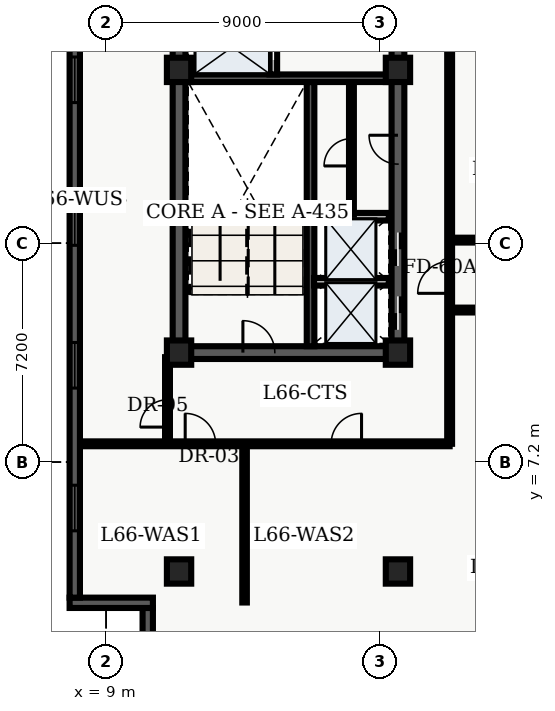
"""IFC4 building model, lengths in metres.
Left out: names, types, materials, properties, quantities, classifications, styles, units other than length and angle.
Written with IfcOpenShell. Run it as: python <this file> out.ifc"""

import sys

from ifc_helpers import new_model, entity, si_unit, converted_unit, direction, frame, origin_with_axes, origin_2d_with_axis, place, context, subcontext, project, spatial, polyline, rectangle, outline, extrude, element, fill, save


model = new_model("IFC4")
c1 = context("Model", 3, precision=1e-05, world=origin_with_axes(), true_north=direction((0.0, 1.0)))
c2 = subcontext(c1, "Body", "Model", "MODEL_VIEW")
j1 = project(units=[si_unit("LENGTHUNIT", "METRE"), converted_unit("PLANEANGLEUNIT", "DEGREE", entity("IfcPlaneAngleMeasure", 0.017), si_unit("PLANEANGLEUNIT", "RADIAN"), dimensions=[0, 0, 0, 0, 0, 0, 0])], contexts=[c1])
p1 = place(None, origin_with_axes())
s1 = spatial("IfcSite", under=j1, at=p1, CompositionType="ELEMENT")
p2 = place(p1, origin_with_axes())
s2 = spatial("IfcBuilding", under=s1, at=p2, CompositionType="ELEMENT")
p3 = place(p2, frame((0.0, 0.0, 268.5), z_axis=(0.0, 0.0, 1.0), x_axis=(1.0, 0.0, 0.0)))
s3 = spatial("IfcBuildingStorey", under=s2, at=p3, CompositionType="ELEMENT", Elevation=268.5)
p4 = place(p3, frame((11.4, 10.8, 0.0), z_axis=(0.0, 0.0, 1.0), x_axis=(0.0, 1.0, 0.0)))
e1 = element("IfcWall", 1, at=p4, inside=s3, PredefinedType="SHEAR", context=c2, shape_type="SweptSolid", body=[
    extrude(outline(polyline([(0.0, -0.21), (27.0, -0.21), (27.0, 0.21), (0.0, 0.21), (0.0, -0.21)])), origin_with_axes(), (0.0, 0.0, 1.0), 3.66),
])
p5 = place(p3, frame((11.4, 10.8, 0.0), z_axis=(0.0, 0.0, 1.0), x_axis=(1.0, 0.0, 0.0)))
e2 = element("IfcWall", 2, at=p5, inside=s3, PredefinedType="SHEAR", context=c2, shape_type="SweptSolid", body=[
    extrude(outline(polyline([(0.0, -0.21), (7.2, -0.21), (7.2, 0.21), (0.0, 0.21), (0.0, -0.21)])), origin_with_axes(), (0.0, 0.0, 1.0), 3.66),
])
p6 = place(p5, frame((2.625, 0.0, 0.0), z_axis=(0.0, 0.0, 1.0), x_axis=(1.0, 0.0, 0.0)))
e3 = element("IfcOpeningElement", 3, at=p6, cuts=e2, PredefinedType="OPENING", context=c2, shape_type="SweptSolid", body=[
    extrude(rectangle(XDim=1.05, YDim=0.44, at=origin_2d_with_axis()), origin_with_axes(), (0.0, 0.0, 1.0), 2.15),
])
p7 = place(p3, frame((18.6, 10.8, 0.0), z_axis=(0.0, 0.0, 1.0), x_axis=(0.0, 1.0, 0.0)))
e4 = element("IfcWall", 4, at=p7, inside=s3, PredefinedType="SHEAR", context=c2, shape_type="SweptSolid", body=[
    extrude(outline(polyline([(0.0, -0.21), (13.5, -0.21), (13.5, 0.21), (0.0, 0.21), (0.0, -0.21)])), origin_with_axes(), (0.0, 0.0, 1.0), 3.66),
])
p8 = place(p7, frame((1.3, 0.0, 0.0), z_axis=(0.0, 0.0, 1.0), x_axis=(1.0, 0.0, 0.0)))
e5 = element("IfcOpeningElement", 5, at=p8, cuts=e4, PredefinedType="OPENING", context=c2, shape_type="SweptSolid", body=[
    extrude(rectangle(XDim=1.1, YDim=0.44, at=origin_2d_with_axis()), origin_with_axes(), (0.0, 0.0, 1.0), 2.15),
])
p9 = place(p7, frame((3.4, 0.0, 0.0), z_axis=(0.0, 0.0, 1.0), x_axis=(1.0, 0.0, 0.0)))
e6 = element("IfcOpeningElement", 6, at=p9, cuts=e4, PredefinedType="OPENING", context=c2, shape_type="SweptSolid", body=[
    extrude(rectangle(XDim=1.1, YDim=0.44, at=origin_2d_with_axis()), origin_with_axes(), (0.0, 0.0, 1.0), 2.15),
])
p10 = place(p7, frame((11.125, 0.0, 0.0), z_axis=(0.0, 0.0, 1.0), x_axis=(1.0, 0.0, 0.0)))
e7 = element("IfcOpeningElement", 7, at=p10, cuts=e4, PredefinedType="OPENING", context=c2, shape_type="SweptSolid", body=[
    extrude(rectangle(XDim=1.05, YDim=0.44, at=origin_2d_with_axis()), origin_with_axes(), (0.0, 0.0, 1.0), 2.15),
])
p11 = place(p7, frame((6.675, 0.0, 0.0), z_axis=(0.0, 0.0, 1.0), x_axis=(1.0, 0.0, 0.0)))
e8 = element("IfcOpeningElement", 8, at=p11, cuts=e4, PredefinedType="OPENING", context=c2, shape_type="SweptSolid", body=[
    extrude(rectangle(XDim=0.95, YDim=0.44, at=origin_2d_with_axis()), origin_with_axes(), (0.0, 0.0, 1.0), 2.15),
])
p12 = place(p3, frame((15.725, 11.01, 0.0), z_axis=(0.0, 0.0, 1.0), x_axis=(0.0, 1.0, 0.0)))
e9 = element("IfcWall", 9, at=p12, inside=s3, PredefinedType="SHEAR", context=c2, shape_type="SweptSolid", body=[
    extrude(outline(polyline([(0.0, -0.125), (8.69, -0.125), (8.69, 0.125), (0.0, 0.125), (0.0, -0.125)])), origin_with_axes(), (0.0, 0.0, 1.0), 3.66),
])
p13 = place(p3, frame((11.61, 19.825, 0.0), z_axis=(0.0, 0.0, 1.0), x_axis=(1.0, 0.0, 0.0)))
e10 = element("IfcWall", 10, at=p13, inside=s3, PredefinedType="SHEAR", context=c2, shape_type="SweptSolid", body=[
    extrude(outline(polyline([(0.0, -0.125), (6.78, -0.125), (6.78, 0.125), (0.0, 0.125), (0.0, -0.125)])), origin_with_axes(), (0.0, 0.0, 1.0), 3.66),
])
p14 = place(p3, frame((14.5, 19.95, 0.0), z_axis=(0.0, 0.0, 1.0), x_axis=(0.0, 1.0, 0.0)))
e11 = element("IfcWall", 11, at=p14, inside=s3, PredefinedType="SOLIDWALL", context=c2, shape_type="SweptSolid", body=[
    extrude(outline(polyline([(0.0, -0.125), (6.25, -0.125), (6.25, 0.125), (0.0, 0.125), (0.0, -0.125)])), origin_with_axes(), (0.0, 0.0, 1.0), 2.7),
])
p15 = place(p14, frame((1.025, 0.0, 0.0), z_axis=(0.0, 0.0, 1.0), x_axis=(1.0, 0.0, 0.0)))
e12 = element("IfcOpeningElement", 12, at=p15, cuts=e11, PredefinedType="OPENING", context=c2, shape_type="SweptSolid", body=[
    extrude(rectangle(XDim=1.1, YDim=0.27, at=origin_2d_with_axis()), origin_with_axes(), (0.0, 0.0, 1.0), 2.15),
])
p16 = place(p14, frame((2.975, 0.0, 0.0), z_axis=(0.0, 0.0, 1.0), x_axis=(1.0, 0.0, 0.0)))
e13 = element("IfcOpeningElement", 13, at=p16, cuts=e11, PredefinedType="OPENING", context=c2, shape_type="SweptSolid", body=[
    extrude(rectangle(XDim=1.1, YDim=0.27, at=origin_2d_with_axis()), origin_with_axes(), (0.0, 0.0, 1.0), 2.15),
])
p17 = place(p14, frame((5.425, 0.0, 0.0), z_axis=(0.0, 0.0, 1.0), x_axis=(1.0, 0.0, 0.0)))
e14 = element("IfcOpeningElement", 14, at=p17, cuts=e11, PredefinedType="OPENING", context=c2, shape_type="SweptSolid", body=[
    extrude(rectangle(XDim=1.2, YDim=0.27, at=origin_2d_with_axis()), origin_with_axes(), (0.0, 0.0, 1.0), 2.15),
])
for number, where, z_axis, x_axis in (
    (15, (11.4, 3.6, 0.0), (0.0, 0.0, 1.0), (1.0, 0.0, 0.0)),
    (16, (11.4, 10.8, 0.0), (0.0, 0.0, 1.0), (1.0, 0.0, 0.0)),
    (17, (11.4, 20.1, 0.0), (0.0, 0.0, 1.0), (1.0, 0.0, 0.0)),
    (18, (18.6, 3.6, 0.0), (0.0, 0.0, 1.0), (1.0, 0.0, 0.0)),
    (19, (18.6, 10.8, 0.0), (0.0, 0.0, 1.0), (1.0, 0.0, 0.0)),
    (20, (18.6, 20.1, 0.0), (0.0, 0.0, 1.0), (1.0, 0.0, 0.0)),
):
    element("IfcColumn", number, at=place(p3, frame(where, z_axis=z_axis, x_axis=x_axis)), inside=s3, PredefinedType="COLUMN", context=c2, shape_type="SweptSolid", body=[
        extrude(rectangle(XDim=0.8, YDim=0.8, at=origin_2d_with_axis()), origin_with_axes(), (0.0, 0.0, 1.0), 3.9),
    ])
for number, where, z_axis, x_axis in (
    (21, (15.84, 13.13, 0.0), (0.0, 0.0, 1.0), (1.0, 0.0, 0.0)),
    (22, (15.84, 15.27, 0.0), (0.0, 0.0, 1.0), (1.0, 0.0, 0.0)),
):
    element("IfcWall", number, at=place(p3, frame(where, z_axis=z_axis, x_axis=x_axis)), inside=s3, PredefinedType="SOLIDWALL", context=c2, shape_type="SweptSolid", body=[
        extrude(outline(polyline([(0.0, -0.125), (2.46, -0.125), (2.46, 0.125), (0.0, 0.125), (0.0, -0.125)])), origin_with_axes(), (0.0, 0.0, 1.0), 2.7),
    ])
p18 = place(p3, frame((17.07, 15.34, 0.0), z_axis=(0.0, 0.0, 1.0), x_axis=(0.0, 1.0, 0.0)))
e23 = element("IfcWall", 23, at=p18, inside=s3, PredefinedType="PARTITIONING", context=c2, shape_type="SweptSolid", body=[
    extrude(outline(polyline([(0.0, -0.08), (4.36, -0.08), (4.36, 0.08), (0.0, 0.08), (0.0, -0.08)])), origin_with_axes(), (0.0, 0.0, 1.0), 2.7),
])
p19 = place(p18, frame((2.05, 0.0, 0.0), z_axis=(0.0, 0.0, 1.0), x_axis=(1.0, 0.0, 0.0)))
e24 = element("IfcOpeningElement", 24, at=p19, cuts=e23, PredefinedType="OPENING", context=c2, shape_type="SweptSolid", body=[
    extrude(rectangle(XDim=0.9, YDim=0.18, at=origin_2d_with_axis()), origin_with_axes(), (0.0, 0.0, 1.0), 2.15),
])
p20 = place(p3, frame((8.135, 7.8, 0.0), z_axis=(0.0, 0.0, 1.0), x_axis=(1.0, 0.0, 0.0)))
e25 = element("IfcWall", 25, at=p20, inside=s3, PredefinedType="PARTITIONING", context=c2, shape_type="SweptSolid", body=[
    extrude(outline(polyline([(0.0, -0.08), (12.165, -0.08), (12.165, 0.08), (0.0, 0.08), (0.0, -0.08)])), origin_with_axes(), (0.0, 0.0, 1.0), 2.7),
])
p21 = place(p20, frame((3.967, 0.0, 0.0), z_axis=(0.0, 0.0, 1.0), x_axis=(1.0, 0.0, 0.0)))
e26 = element("IfcOpeningElement", 26, at=p21, cuts=e25, PredefinedType="OPENING", context=c2, shape_type="SweptSolid", body=[
    extrude(rectangle(XDim=1.0, YDim=0.18, at=origin_2d_with_axis()), origin_with_axes(), (0.0, 0.0, 1.0), 2.15),
])
p22 = place(p20, frame((8.768, 0.0, 0.0), z_axis=(0.0, 0.0, 1.0), x_axis=(1.0, 0.0, 0.0)))
e27 = element("IfcOpeningElement", 27, at=p22, cuts=e25, PredefinedType="OPENING", context=c2, shape_type="SweptSolid", body=[
    extrude(rectangle(XDim=1.0, YDim=0.18, at=origin_2d_with_axis()), origin_with_axes(), (0.0, 0.0, 1.0), 2.15),
])
p23 = place(p3, frame((20.3, 7.8, 0.0), z_axis=(0.0, 0.0, 1.0), x_axis=(0.0, 1.0, 0.0)))
e28 = element("IfcWall", 28, at=p23, inside=s3, PredefinedType="PARTITIONING", context=c2, shape_type="SweptSolid", body=[
    extrude(outline(polyline([(0.0, -0.08), (32.7, -0.08), (32.7, 0.08), (0.0, 0.08), (0.0, -0.08)])), origin_with_axes(), (0.0, 0.0, 1.0), 2.7),
])
p24 = place(p23, frame((14.2, 0.0, 0.0), z_axis=(0.0, 0.0, 1.0), x_axis=(1.0, 0.0, 0.0)))
e29 = element("IfcOpeningElement", 29, at=p24, cuts=e28, PredefinedType="OPENING", context=c2, shape_type="SweptSolid", body=[
    extrude(rectangle(XDim=1.0, YDim=0.18, at=origin_2d_with_axis()), origin_with_axes(), (0.0, 0.0, 1.0), 2.15),
])
p25 = place(p23, frame((18.215, 0.0, 0.0), z_axis=(0.0, 0.0, 1.0), x_axis=(1.0, 0.0, 0.0)))
e30 = element("IfcOpeningElement", 30, at=p25, cuts=e28, PredefinedType="OPENING", context=c2, shape_type="SweptSolid", body=[
    extrude(rectangle(XDim=1.0, YDim=0.18, at=origin_2d_with_axis()), origin_with_axes(), (0.0, 0.0, 1.0), 2.15),
])
p26 = place(p23, frame((22.221, 0.0, 0.0), z_axis=(0.0, 0.0, 1.0), x_axis=(1.0, 0.0, 0.0)))
e31 = element("IfcOpeningElement", 31, at=p26, cuts=e28, PredefinedType="OPENING", context=c2, shape_type="SweptSolid", body=[
    extrude(rectangle(XDim=1.0, YDim=0.18, at=origin_2d_with_axis()), origin_with_axes(), (0.0, 0.0, 1.0), 2.15),
])
p27 = place(p23, frame((25.553, 0.0, 0.0), z_axis=(0.0, 0.0, 1.0), x_axis=(1.0, 0.0, 0.0)))
e32 = element("IfcOpeningElement", 32, at=p27, cuts=e28, PredefinedType="OPENING", context=c2, shape_type="SweptSolid", body=[
    extrude(rectangle(XDim=1.0, YDim=0.18, at=origin_2d_with_axis()), origin_with_axes(), (0.0, 0.0, 1.0), 2.15),
])
p28 = place(p23, frame((5.475, 0.0, 0.0), z_axis=(0.0, 0.0, 1.0), x_axis=(1.0, 0.0, 0.0)))
e33 = element("IfcOpeningElement", 33, at=p28, cuts=e28, PredefinedType="OPENING", context=c2, shape_type="SweptSolid", body=[
    extrude(rectangle(XDim=1.05, YDim=0.18, at=origin_2d_with_axis()), origin_with_axes(), (0.0, 0.0, 1.0), 2.15),
])
p29 = place(p3, frame((11.02, 7.8, 0.0), z_axis=(0.0, 0.0, 1.0), x_axis=(0.0, 1.0, 0.0)))
e34 = element("IfcWall", 34, at=p29, inside=s3, PredefinedType="PARTITIONING", context=c2, shape_type="SweptSolid", body=[
    extrude(outline(polyline([(0.0, -0.08), (2.85, -0.08), (2.85, 0.08), (0.0, 0.08), (0.0, -0.08)])), origin_with_axes(), (0.0, 0.0, 1.0), 2.7),
])
p30 = place(p29, frame((1.0, 0.0, 0.0), z_axis=(0.0, 0.0, 1.0), x_axis=(1.0, 0.0, 0.0)))
e35 = element("IfcOpeningElement", 35, at=p30, cuts=e34, PredefinedType="OPENING", context=c2, shape_type="SweptSolid", body=[
    extrude(rectangle(XDim=0.9, YDim=0.18, at=origin_2d_with_axis()), origin_with_axes(), (0.0, 0.0, 1.0), 2.15),
])
p31 = place(p3, frame((13.555, 2.58, 0.0), z_axis=(0.0, 0.0, 1.0), x_axis=(0.0, 1.0, 0.0)))
e36 = element("IfcWall", 36, at=p31, inside=s3, PredefinedType="PARTITIONING", context=c2, shape_type="SweptSolid", body=[
    extrude(outline(polyline([(0.0, -0.075), (5.12, -0.075), (5.12, 0.075), (0.0, 0.075), (0.0, -0.075)])), origin_with_axes(), (0.0, 0.0, 1.0), 2.7),
])
p32 = place(p3, frame((20.3, 12.2, 0.0), z_axis=(0.0, 0.0, 1.0), x_axis=(1.0, 0.0, 0.0)))
e37 = element("IfcWall", 37, at=p32, inside=s3, PredefinedType="PARTITIONING", context=c2, shape_type="SweptSolid", body=[
    extrude(outline(polyline([(0.0, -0.08), (14.85, -0.08), (14.85, 0.08), (0.0, 0.08), (0.0, -0.08)])), origin_with_axes(), (0.0, 0.0, 1.0), 2.7),
])
p33 = place(p32, frame((8.355, 0.0, 0.0), z_axis=(0.0, 0.0, 1.0), x_axis=(1.0, 0.0, 0.0)))
e38 = element("IfcOpeningElement", 38, at=p33, cuts=e37, PredefinedType="OPENING", context=c2, shape_type="SweptSolid", body=[
    extrude(rectangle(XDim=1.0, YDim=0.18, at=origin_2d_with_axis()), origin_with_axes(), (0.0, 0.0, 1.0), 2.15),
])
p34 = place(p3, frame((20.3, 14.5, 0.0), z_axis=(0.0, 0.0, 1.0), x_axis=(1.0, 0.0, 0.0)))
e39 = element("IfcWall", 39, at=p34, inside=s3, PredefinedType="PARTITIONING", context=c2, shape_type="SweptSolid", body=[
    extrude(outline(polyline([(0.0, -0.08), (14.85, -0.08), (14.85, 0.08), (0.0, 0.08), (0.0, -0.08)])), origin_with_axes(), (0.0, 0.0, 1.0), 2.7),
])
p35 = place(p34, frame((2.495, 0.0, 0.0), z_axis=(0.0, 0.0, 1.0), x_axis=(1.0, 0.0, 0.0)))
e40 = element("IfcOpeningElement", 40, at=p35, cuts=e39, PredefinedType="OPENING", context=c2, shape_type="SweptSolid", body=[
    extrude(rectangle(XDim=1.0, YDim=0.18, at=origin_2d_with_axis()), origin_with_axes(), (0.0, 0.0, 1.0), 2.15),
])
p36 = place(p34, frame((6.056, 0.0, 0.0), z_axis=(0.0, 0.0, 1.0), x_axis=(1.0, 0.0, 0.0)))
e41 = element("IfcOpeningElement", 41, at=p36, cuts=e39, PredefinedType="OPENING", context=c2, shape_type="SweptSolid", body=[
    extrude(rectangle(XDim=1.0, YDim=0.18, at=origin_2d_with_axis()), origin_with_axes(), (0.0, 0.0, 1.0), 2.15),
])
p37 = place(p34, frame((9.19, 0.0, 0.0), z_axis=(0.0, 0.0, 1.0), x_axis=(1.0, 0.0, 0.0)))
e42 = element("IfcOpeningElement", 42, at=p37, cuts=e39, PredefinedType="OPENING", context=c2, shape_type="SweptSolid", body=[
    extrude(rectangle(XDim=1.0, YDim=0.18, at=origin_2d_with_axis()), origin_with_axes(), (0.0, 0.0, 1.0), 2.15),
])
p38 = place(p34, frame((12.925, 0.0, 0.0), z_axis=(0.0, 0.0, 1.0), x_axis=(1.0, 0.0, 0.0)))
e43 = element("IfcOpeningElement", 43, at=p38, cuts=e39, PredefinedType="OPENING", context=c2, shape_type="SweptSolid", body=[
    extrude(rectangle(XDim=1.0, YDim=0.18, at=origin_2d_with_axis()), origin_with_axes(), (0.0, 0.0, 1.0), 2.15),
])
p39 = place(p3, frame((10.37, 0.34, 0.0), z_axis=(0.0, 0.0, 1.0), x_axis=(0.0, 1.0, 0.0)))
e44 = element("IfcWall", 44, at=p39, inside=s3, PredefinedType="SOLIDWALL", context=c2, shape_type="SweptSolid", body=[
    extrude(outline(polyline([(0.0, -0.17), (2.06, -0.17), (2.06, 0.17), (0.0, 0.17), (0.0, -0.17)])), origin_with_axes(), (0.0, 0.0, 1.0), 3.66),
])
p40 = place(p3, frame((10.54, 2.57, 0.0), z_axis=(0.0, 0.0, 1.0), x_axis=(-1.0, 0.0, 0.0)))
e45 = element("IfcWall", 45, at=p40, inside=s3, PredefinedType="SOLIDWALL", context=c2, shape_type="SweptSolid", body=[
    extrude(outline(polyline([(0.0, -0.17), (2.74, -0.17), (2.74, 0.17), (0.0, 0.17), (0.0, -0.17)])), origin_with_axes(), (0.0, 0.0, 1.0), 3.66),
])
p41 = place(p3, frame((7.97, 2.74, 0.0), z_axis=(0.0, 0.0, 1.0), x_axis=(0.0, 1.0, 0.0)))
e46 = element("IfcWall", 46, at=p41, inside=s3, PredefinedType="SOLIDWALL", context=c2, shape_type="SweptSolid", body=[
    extrude(outline(polyline([(0.0, -0.17), (43.46, -0.17), (43.46, 0.17), (0.0, 0.17), (0.0, -0.17)])), origin_with_axes(), (0.0, 0.0, 1.0), 3.66),
])
p42 = place(p41, frame((2.948, 0.0, 0.45), z_axis=(0.0, 0.0, 1.0), x_axis=(1.0, 0.0, 0.0)))
e47 = element("IfcOpeningElement", 47, at=p42, cuts=e46, PredefinedType="OPENING", context=c2, shape_type="SweptSolid", body=[
    extrude(rectangle(XDim=1.5, YDim=0.36, at=origin_2d_with_axis()), origin_with_axes(), (0.0, 0.0, 1.0), 2.1),
])
p43 = place(p41, frame((7.643, 0.0, 0.45), z_axis=(0.0, 0.0, 1.0), x_axis=(1.0, 0.0, 0.0)))
e48 = element("IfcOpeningElement", 48, at=p43, cuts=e46, PredefinedType="OPENING", context=c2, shape_type="SweptSolid", body=[
    extrude(rectangle(XDim=1.5, YDim=0.36, at=origin_2d_with_axis()), origin_with_axes(), (0.0, 0.0, 1.0), 2.1),
])
p44 = place(p41, frame((12.339, 0.0, 0.45), z_axis=(0.0, 0.0, 1.0), x_axis=(1.0, 0.0, 0.0)))
e49 = element("IfcOpeningElement", 49, at=p44, cuts=e46, PredefinedType="OPENING", context=c2, shape_type="SweptSolid", body=[
    extrude(rectangle(XDim=1.5, YDim=0.36, at=origin_2d_with_axis()), origin_with_axes(), (0.0, 0.0, 1.0), 2.1),
])
p45 = place(p41, frame((17.034, 0.0, 0.45), z_axis=(0.0, 0.0, 1.0), x_axis=(1.0, 0.0, 0.0)))
e50 = element("IfcOpeningElement", 50, at=p45, cuts=e46, PredefinedType="OPENING", context=c2, shape_type="SweptSolid", body=[
    extrude(rectangle(XDim=1.5, YDim=0.36, at=origin_2d_with_axis()), origin_with_axes(), (0.0, 0.0, 1.0), 2.1),
])
p46 = place(p41, frame((22.58, 0.0, 0.45), z_axis=(0.0, 0.0, 1.0), x_axis=(1.0, 0.0, 0.0)))
e51 = element("IfcOpeningElement", 51, at=p46, cuts=e46, PredefinedType="OPENING", context=c2, shape_type="SweptSolid", body=[
    extrude(rectangle(XDim=1.5, YDim=0.36, at=origin_2d_with_axis()), origin_with_axes(), (0.0, 0.0, 1.0), 2.1),
])
p47 = place(p41, frame((26.426, 0.0, 0.45), z_axis=(0.0, 0.0, 1.0), x_axis=(1.0, 0.0, 0.0)))
e52 = element("IfcOpeningElement", 52, at=p47, cuts=e46, PredefinedType="OPENING", context=c2, shape_type="SweptSolid", body=[
    extrude(rectangle(XDim=1.5, YDim=0.36, at=origin_2d_with_axis()), origin_with_axes(), (0.0, 0.0, 1.0), 2.1),
])
p48 = place(p41, frame((31.121, 0.0, 0.45), z_axis=(0.0, 0.0, 1.0), x_axis=(1.0, 0.0, 0.0)))
e53 = element("IfcOpeningElement", 53, at=p48, cuts=e46, PredefinedType="OPENING", context=c2, shape_type="SweptSolid", body=[
    extrude(rectangle(XDim=1.5, YDim=0.36, at=origin_2d_with_axis()), origin_with_axes(), (0.0, 0.0, 1.0), 2.1),
])
p49 = place(p41, frame((35.817, 0.0, 0.45), z_axis=(0.0, 0.0, 1.0), x_axis=(1.0, 0.0, 0.0)))
e54 = element("IfcOpeningElement", 54, at=p49, cuts=e46, PredefinedType="OPENING", context=c2, shape_type="SweptSolid", body=[
    extrude(rectangle(XDim=1.5, YDim=0.36, at=origin_2d_with_axis()), origin_with_axes(), (0.0, 0.0, 1.0), 2.1),
])
p50 = place(p41, frame((40.512, 0.0, 0.45), z_axis=(0.0, 0.0, 1.0), x_axis=(1.0, 0.0, 0.0)))
e55 = element("IfcOpeningElement", 55, at=p50, cuts=e46, PredefinedType="OPENING", context=c2, shape_type="SweptSolid", body=[
    extrude(rectangle(XDim=1.5, YDim=0.36, at=origin_2d_with_axis()), origin_with_axes(), (0.0, 0.0, 1.0), 2.1),
])
p51 = place(p7, frame((1.3, 0.0, 0.0), z_axis=(0.0, 0.0, 1.0), x_axis=(1.0, 0.0, 0.0)))
e56 = element("IfcDoor", 56, at=p51, inside=s3, OperationType="SLIDING_TO_LEFT", PredefinedType="DOOR", context=c2, shape_type="SweptSolid", body=[
    extrude(rectangle(XDim=1.1, YDim=0.09, at=origin_2d_with_axis()), origin_with_axes(), (0.0, 0.0, 1.0), 2.15),
])
fill(e5, e56)
p52 = place(p7, frame((3.4, 0.0, 0.0), z_axis=(0.0, 0.0, 1.0), x_axis=(1.0, 0.0, 0.0)))
e57 = element("IfcDoor", 57, at=p52, inside=s3, OperationType="SLIDING_TO_RIGHT", PredefinedType="DOOR", context=c2, shape_type="SweptSolid", body=[
    extrude(rectangle(XDim=1.1, YDim=0.09, at=origin_2d_with_axis()), origin_with_axes(), (0.0, 0.0, 1.0), 2.15),
])
fill(e6, e57)
p53 = place(p14, frame((1.025, 0.0, 0.0), z_axis=(0.0, 0.0, 1.0), x_axis=(1.0, 0.0, 0.0)))
e58 = element("IfcDoor", 58, at=p53, inside=s3, OperationType="SLIDING_TO_LEFT", PredefinedType="DOOR", context=c2, shape_type="SweptSolid", body=[
    extrude(rectangle(XDim=1.1, YDim=0.09, at=origin_2d_with_axis()), origin_with_axes(), (0.0, 0.0, 1.0), 2.15),
])
fill(e12, e58)
p54 = place(p5, frame((2.625, 0.0, 0.0), z_axis=(0.0, 0.0, 1.0), x_axis=(1.0, 0.0, 0.0)))
e59 = element("IfcDoor", 59, at=p54, inside=s3, OperationType="SINGLE_SWING_LEFT", PredefinedType="DOOR", context=c2, shape_type="SweptSolid", body=[
    extrude(rectangle(XDim=1.05, YDim=0.09, at=origin_2d_with_axis()), origin_with_axes(), (0.0, 0.0, 1.0), 2.15),
])
fill(e3, e59)
p55 = place(p18, frame((2.05, 0.0, 0.0), z_axis=(0.0, 0.0, 1.0), x_axis=(1.0, 0.0, 0.0)))
e60 = element("IfcDoor", 60, at=p55, inside=s3, OperationType="SINGLE_SWING_LEFT", PredefinedType="DOOR", context=c2, shape_type="SweptSolid", body=[
    extrude(rectangle(XDim=0.9, YDim=0.09, at=origin_2d_with_axis()), origin_with_axes(), (0.0, 0.0, 1.0), 2.15),
])
fill(e24, e60)
p56 = place(p7, frame((6.675, 0.0, 0.0), z_axis=(0.0, 0.0, 1.0), x_axis=(1.0, 0.0, 0.0)))
e61 = element("IfcDoor", 61, at=p56, inside=s3, OperationType="SINGLE_SWING_RIGHT", PredefinedType="DOOR", context=c2, shape_type="SweptSolid", body=[
    extrude(rectangle(XDim=0.95, YDim=0.09, at=origin_2d_with_axis()), origin_with_axes(), (0.0, 0.0, 1.0), 2.15),
])
fill(e8, e61)
p57 = place(p29, frame((1.0, 0.0, 0.0), z_axis=(0.0, 0.0, 1.0), x_axis=(1.0, 0.0, 0.0)))
e62 = element("IfcDoor", 62, at=p57, inside=s3, OperationType="SINGLE_SWING_LEFT", PredefinedType="DOOR", context=c2, shape_type="SweptSolid", body=[
    extrude(rectangle(XDim=0.9, YDim=0.09, at=origin_2d_with_axis()), origin_with_axes(), (0.0, 0.0, 1.0), 2.15),
])
fill(e35, e62)
p58 = place(p20, frame((3.967, 0.0, 0.0), z_axis=(0.0, 0.0, 1.0), x_axis=(1.0, 0.0, 0.0)))
e63 = element("IfcDoor", 63, at=p58, inside=s3, OperationType="SINGLE_SWING_LEFT", PredefinedType="DOOR", context=c2, shape_type="SweptSolid", body=[
    extrude(rectangle(XDim=1.0, YDim=0.09, at=origin_2d_with_axis()), origin_with_axes(), (0.0, 0.0, 1.0), 2.15),
])
fill(e26, e63)
p59 = place(p20, frame((8.768, 0.0, 0.0), z_axis=(0.0, 0.0, 1.0), x_axis=(1.0, 0.0, 0.0)))
e64 = element("IfcDoor", 64, at=p59, inside=s3, OperationType="SINGLE_SWING_RIGHT", PredefinedType="DOOR", context=c2, shape_type="SweptSolid", body=[
    extrude(rectangle(XDim=1.0, YDim=0.09, at=origin_2d_with_axis()), origin_with_axes(), (0.0, 0.0, 1.0), 2.15),
])
fill(e27, e64)
p60 = place(p23, frame((5.475, 0.0, 0.0), z_axis=(0.0, 0.0, 1.0), x_axis=(1.0, 0.0, 0.0)))
e65 = element("IfcDoor", 65, at=p60, inside=s3, OperationType="SINGLE_SWING_LEFT", PredefinedType="DOOR", context=c2, shape_type="SweptSolid", body=[
    extrude(rectangle(XDim=1.05, YDim=0.09, at=origin_2d_with_axis()), origin_with_axes(), (0.0, 0.0, 1.0), 2.15),
])
fill(e33, e65)
p61 = place(p41, frame((2.948, 0.0, 0.45), z_axis=(0.0, 0.0, 1.0), x_axis=(1.0, 0.0, 0.0)))
e66 = element("IfcWindow", 66, at=p61, inside=s3, PredefinedType="WINDOW", context=c2, shape_type="SweptSolid", body=[
    extrude(rectangle(XDim=1.5, YDim=0.09, at=origin_2d_with_axis()), origin_with_axes(), (0.0, 0.0, 1.0), 2.1),
])
fill(e47, e66)
p62 = place(p41, frame((7.643, 0.0, 0.45), z_axis=(0.0, 0.0, 1.0), x_axis=(1.0, 0.0, 0.0)))
e67 = element("IfcWindow", 67, at=p62, inside=s3, PredefinedType="WINDOW", context=c2, shape_type="SweptSolid", body=[
    extrude(rectangle(XDim=1.5, YDim=0.09, at=origin_2d_with_axis()), origin_with_axes(), (0.0, 0.0, 1.0), 2.1),
])
fill(e48, e67)
p63 = place(p41, frame((12.339, 0.0, 0.45), z_axis=(0.0, 0.0, 1.0), x_axis=(1.0, 0.0, 0.0)))
e68 = element("IfcWindow", 68, at=p63, inside=s3, PredefinedType="WINDOW", context=c2, shape_type="SweptSolid", body=[
    extrude(rectangle(XDim=1.5, YDim=0.09, at=origin_2d_with_axis()), origin_with_axes(), (0.0, 0.0, 1.0), 2.1),
])
fill(e49, e68)
p64 = place(p41, frame((17.034, 0.0, 0.45), z_axis=(0.0, 0.0, 1.0), x_axis=(1.0, 0.0, 0.0)))
e69 = element("IfcWindow", 69, at=p64, inside=s3, PredefinedType="WINDOW", context=c2, shape_type="SweptSolid", body=[
    extrude(rectangle(XDim=1.5, YDim=0.09, at=origin_2d_with_axis()), origin_with_axes(), (0.0, 0.0, 1.0), 2.1),
])
fill(e50, e69)
save(model, sys.argv[1])
